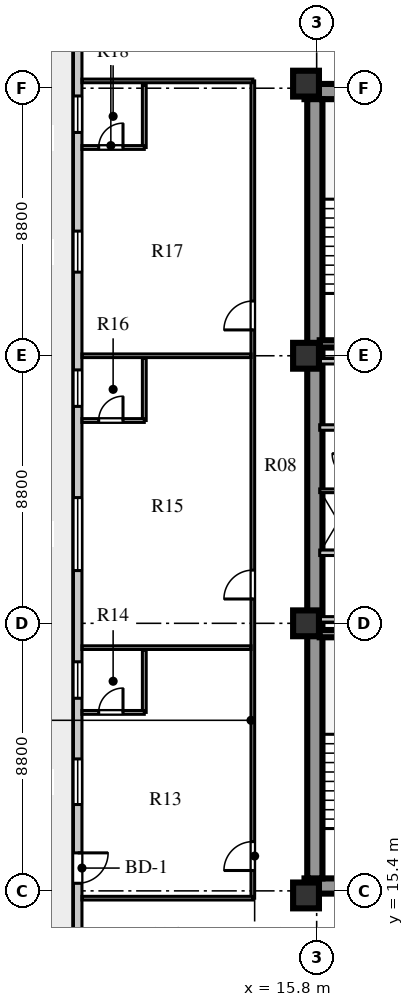
"""IFC4 building model, lengths in metres.
Left out: names, types, materials, properties, quantities, classifications, styles, units other than length and angle.
Written with IfcOpenShell. Run it as: python <this file> out.ifc"""

import sys

from ifc_helpers import new_model, si_unit, direction, frame, frame_2d, origin, origin_2d, place, context, subcontext, project, spatial, rectangle, extrude, element, fill, save


model = new_model("IFC4")
c1 = context("Model", 3, precision=1e-05, world=origin(), true_north=direction((0.0, 1.0)))
c2 = subcontext(c1, "Body", "Model", "MODEL_VIEW")
j1 = project(units=[si_unit("LENGTHUNIT", "METRE"), si_unit("PLANEANGLEUNIT", "RADIAN")], contexts=[c1])
p1 = place(None, origin())
s1 = spatial("IfcSite", under=j1, at=p1, CompositionType="ELEMENT")
p2 = place(p1, origin())
s2 = spatial("IfcBuilding", under=s1, at=p2, CompositionType="ELEMENT")
p3 = place(p2, frame((0.0, 0.0, 181.0)))
s3 = spatial("IfcBuildingStorey", under=s2, at=p3, CompositionType="ELEMENT", Elevation=181.0)
for number, where, z_axis, x_axis in (
    (1, (15.4, 15.56, 0.0), (0.0, 0.0, 1.0), (1.0, 0.0, 0.0)),
    (2, (15.4, 41.69, 0.0), (0.0, 0.0, 1.0), (1.0, 0.0, 0.0)),
):
    element("IfcWall", number, at=place(p3, frame(where, z_axis=z_axis, x_axis=x_axis)), inside=s3, PredefinedType="SHEAR", context=c2, shape_type="SweptSolid", body=[
        extrude(rectangle(XDim=9.68, YDim=0.5, at=frame_2d((4.84, 0.0))), origin(), (0.0, 0.0, 1.0), 3.6),
    ])
p4 = place(p3, frame((15.74, 15.81, 0.0), z_axis=(0.0, 0.0, 1.0), x_axis=(0.0, 1.0, 0.0)))
e3 = element("IfcWall", 3, at=p4, inside=s3, PredefinedType="SHEAR", context=c2, shape_type="SweptSolid", body=[
    extrude(rectangle(XDim=25.63, YDim=0.5, at=frame_2d((12.815, 0.0))), origin(), (0.0, 0.0, 1.0), 3.6),
])
for number, where, z_axis, x_axis in (
    (4, (15.45, 15.25, 0.0), (0.0, 0.0, 1.0), (1.0, 0.0, 0.0)),
    (5, (15.45, 24.2, 0.0), (0.0, 0.0, 1.0), (1.0, 0.0, 0.0)),
    (6, (15.45, 33.0, 0.0), (0.0, 0.0, 1.0), (1.0, 0.0, 0.0)),
    (7, (15.45, 41.95, 0.0), (0.0, 0.0, 1.0), (1.0, 0.0, 0.0)),
):
    element("IfcColumn", number, at=place(p3, frame(where, z_axis=z_axis, x_axis=x_axis)), inside=s3, PredefinedType="COLUMN", context=c2, shape_type="SweptSolid", body=[
        extrude(rectangle(XDim=0.85, YDim=0.85, at=origin_2d()), origin(), (0.0, 0.0, 1.0), 3.6),
    ])
p5 = place(p3, frame((7.94, 44.07, 0.0), z_axis=(0.0, 0.0, 1.0), x_axis=(0.0, -1.0, 0.0)))
e8 = element("IfcWall", 8, at=p5, inside=s3, PredefinedType="STANDARD", context=c2, shape_type="SweptSolid", body=[
    extrude(rectangle(XDim=30.94, YDim=0.28, at=frame_2d((15.47, 0.0))), origin(), (0.0, 0.0, 1.0), 3.6),
])
p6 = place(p5, frame((27.42, 0.0, 0.0)))
e9 = element("IfcOpeningElement", 9, at=p6, cuts=e8, PredefinedType="OPENING", context=c2, shape_type="SweptSolid", body=[
    extrude(rectangle(XDim=1.0, YDim=2.05, at=frame_2d((0.5, 1.025))), frame((0.0, 0.15, 0.0), z_axis=(0.0, -1.0, 0.0), x_axis=(1.0, 0.0, 0.0)), (0.0, 0.0, 1.0), 0.3),
])
p7 = place(p5, frame((24.33, 0.0, 0.8)))
e10 = element("IfcOpeningElement", 10, at=p7, cuts=e8, PredefinedType="OPENING", context=c2, shape_type="SweptSolid", body=[
    extrude(rectangle(XDim=1.5, YDim=2.0, at=frame_2d((0.75, 1.0))), frame((0.0, 0.15, 0.0), z_axis=(0.0, -1.0, 0.0), x_axis=(1.0, 0.0, 0.0)), (0.0, 0.0, 1.0), 0.3),
])
p8 = place(p5, frame((21.135, 0.0, 0.8)))
e11 = element("IfcOpeningElement", 11, at=p8, cuts=e8, PredefinedType="OPENING", context=c2, shape_type="SweptSolid", body=[
    extrude(rectangle(XDim=1.2, YDim=1.75, at=frame_2d((0.6, 0.875))), frame((0.0, 0.15, 0.0), z_axis=(0.0, -1.0, 0.0), x_axis=(1.0, 0.0, 0.0)), (0.0, 0.0, 1.0), 0.3),
])
p9 = place(p5, frame((15.735, 0.0, 0.8)))
e12 = element("IfcOpeningElement", 12, at=p9, cuts=e8, PredefinedType="OPENING", context=c2, shape_type="SweptSolid", body=[
    extrude(rectangle(XDim=2.4, YDim=2.05, at=frame_2d((1.2, 1.025))), frame((0.0, 0.15, 0.0), z_axis=(0.0, -1.0, 0.0), x_axis=(1.0, 0.0, 0.0)), (0.0, 0.0, 1.0), 0.3),
])
p10 = place(p5, frame((11.535, 0.0, 0.8)))
e13 = element("IfcOpeningElement", 13, at=p10, cuts=e8, PredefinedType="OPENING", context=c2, shape_type="SweptSolid", body=[
    extrude(rectangle(XDim=1.2, YDim=1.75, at=frame_2d((0.6, 0.875))), frame((0.0, 0.15, 0.0), z_axis=(0.0, -1.0, 0.0), x_axis=(1.0, 0.0, 0.0)), (0.0, 0.0, 1.0), 0.3),
])
p11 = place(p5, frame((6.97, 0.0, 0.8)))
e14 = element("IfcOpeningElement", 14, at=p11, cuts=e8, PredefinedType="OPENING", context=c2, shape_type="SweptSolid", body=[
    extrude(rectangle(XDim=1.35, YDim=1.9, at=frame_2d((0.675, 0.95))), frame((0.0, 0.15, 0.0), z_axis=(0.0, -1.0, 0.0), x_axis=(1.0, 0.0, 0.0)), (0.0, 0.0, 1.0), 0.3),
])
p12 = place(p5, frame((2.525, 0.0, 0.8)))
e15 = element("IfcOpeningElement", 15, at=p12, cuts=e8, PredefinedType="OPENING", context=c2, shape_type="SweptSolid", body=[
    extrude(rectangle(XDim=1.2, YDim=1.75, at=frame_2d((0.6, 0.875))), frame((0.0, 0.15, 0.0), z_axis=(0.0, -1.0, 0.0), x_axis=(1.0, 0.0, 0.0)), (0.0, 0.0, 1.0), 0.3),
])
p13 = place(p3, frame((15.9, 23.86, 0.0), z_axis=(0.0, 0.0, 1.0), x_axis=(1.0, 0.0, 0.0)))
e16 = element("IfcWall", 16, at=p13, inside=s3, PredefinedType="SHEAR", context=c2, shape_type="SweptSolid", body=[
    extrude(rectangle(XDim=3.52, YDim=0.24, at=frame_2d((1.76, 0.0))), origin(), (0.0, 0.0, 1.0), 3.85),
])
p14 = place(p3, frame((15.9, 26.52, 0.0), z_axis=(0.0, 0.0, 1.0), x_axis=(1.0, 0.0, 0.0)))
e17 = element("IfcWall", 17, at=p14, inside=s3, PredefinedType="SOLIDWALL", context=c2, shape_type="SweptSolid", body=[
    extrude(rectangle(XDim=8.68, YDim=0.18, at=frame_2d((4.34, 0.0))), origin(), (0.0, 0.0, 1.0), 3.6),
])
p15 = place(p14, frame((2.05, 0.0, 0.0)))
e18 = element("IfcOpeningElement", 18, at=p15, cuts=e17, PredefinedType="OPENING", context=c2, shape_type="SweptSolid", body=[
    extrude(rectangle(XDim=0.85, YDim=2.06, at=frame_2d((0.425, 1.03))), frame((0.0, 0.1, 0.0), z_axis=(0.0, -1.0, 0.0), x_axis=(1.0, 0.0, 0.0)), (0.0, 0.0, 1.0), 0.2),
])
p16 = place(p14, frame((5.2, 0.0, 0.0)))
e19 = element("IfcOpeningElement", 19, at=p16, cuts=e17, PredefinedType="OPENING", context=c2, shape_type="SweptSolid", body=[
    extrude(rectangle(XDim=0.95, YDim=2.1, at=frame_2d((0.475, 1.05))), frame((0.0, 0.1, 0.0), z_axis=(0.0, -1.0, 0.0), x_axis=(1.0, 0.0, 0.0)), (0.0, 0.0, 1.0), 0.2),
])
p17 = place(p3, frame((15.9, 24.33, 0.0), z_axis=(0.0, 0.0, 1.0), x_axis=(1.0, 0.0, 0.0)))
e20 = element("IfcWall", 20, at=p17, inside=s3, PredefinedType="SOLIDWALL", context=c2, shape_type="SweptSolid", body=[
    extrude(rectangle(XDim=8.68, YDim=0.18, at=frame_2d((4.34, 0.0))), origin(), (0.0, 0.0, 1.0), 2.95),
])
p18 = place(p3, frame((15.9, 28.56, 0.0), z_axis=(0.0, 0.0, 1.0), x_axis=(1.0, 0.0, 0.0)))
e21 = element("IfcWall", 21, at=p18, inside=s3, PredefinedType="PARTITIONING", context=c2, shape_type="SweptSolid", body=[
    extrude(rectangle(XDim=1.2, YDim=0.12, at=frame_2d((0.6, 0.0))), origin(), (0.0, 0.0, 1.0), 3.6),
])
p19 = place(p3, frame((15.9, 30.64, 0.0), z_axis=(0.0, 0.0, 1.0), x_axis=(1.0, 0.0, 0.0)))
e22 = element("IfcWall", 22, at=p19, inside=s3, PredefinedType="SOLIDWALL", context=c2, shape_type="SweptSolid", body=[
    extrude(rectangle(XDim=8.68, YDim=0.18, at=frame_2d((4.34, 0.0))), origin(), (0.0, 0.0, 1.0), 3.6),
])
p20 = place(p19, frame((1.76, 0.0, 0.0)))
e23 = element("IfcOpeningElement", 23, at=p20, cuts=e22, PredefinedType="OPENING", context=c2, shape_type="SweptSolid", body=[
    extrude(rectangle(XDim=1.0, YDim=2.1, at=frame_2d((0.5, 1.05))), frame((0.0, 0.1, 0.0), z_axis=(0.0, -1.0, 0.0), x_axis=(1.0, 0.0, 0.0)), (0.0, 0.0, 1.0), 0.2),
])
p21 = place(p19, frame((3.6, 0.0, 0.0)))
e24 = element("IfcOpeningElement", 24, at=p21, cuts=e22, PredefinedType="OPENING", context=c2, shape_type="SweptSolid", body=[
    extrude(rectangle(XDim=1.0, YDim=2.1, at=frame_2d((0.5, 1.05))), frame((0.0, 0.1, 0.0), z_axis=(0.0, -1.0, 0.0), x_axis=(1.0, 0.0, 0.0)), (0.0, 0.0, 1.0), 0.2),
])
p22 = place(p19, frame((5.44, 0.0, 0.0)))
e25 = element("IfcOpeningElement", 25, at=p22, cuts=e22, PredefinedType="OPENING", context=c2, shape_type="SweptSolid", body=[
    extrude(rectangle(XDim=1.0, YDim=2.1, at=frame_2d((0.5, 1.05))), frame((0.0, 0.1, 0.0), z_axis=(0.0, -1.0, 0.0), x_axis=(1.0, 0.0, 0.0)), (0.0, 0.0, 1.0), 0.2),
])
p23 = place(p19, frame((7.28, 0.0, 0.0)))
e26 = element("IfcOpeningElement", 26, at=p23, cuts=e22, PredefinedType="OPENING", context=c2, shape_type="SweptSolid", body=[
    extrude(rectangle(XDim=1.0, YDim=2.1, at=frame_2d((0.5, 1.05))), frame((0.0, 0.1, 0.0), z_axis=(0.0, -1.0, 0.0), x_axis=(1.0, 0.0, 0.0)), (0.0, 0.0, 1.0), 0.2),
])
p24 = place(p3, frame((15.9, 32.82, 0.0), z_axis=(0.0, 0.0, 1.0), x_axis=(1.0, 0.0, 0.0)))
e27 = element("IfcWall", 27, at=p24, inside=s3, PredefinedType="SOLIDWALL", context=c2, shape_type="SweptSolid", body=[
    extrude(rectangle(XDim=8.68, YDim=0.18, at=frame_2d((4.34, 0.0))), origin(), (0.0, 0.0, 1.0), 2.95),
])
p25 = place(p3, frame((15.9, 33.39, 0.0), z_axis=(0.0, 0.0, 1.0), x_axis=(1.0, 0.0, 0.0)))
e28 = element("IfcWall", 28, at=p25, inside=s3, PredefinedType="SHEAR", context=c2, shape_type="SweptSolid", body=[
    extrude(rectangle(XDim=3.52, YDim=0.24, at=frame_2d((1.76, 0.0))), origin(), (0.0, 0.0, 1.0), 3.85),
])
p26 = place(p3, frame((13.7, 15.16, 0.0), z_axis=(0.0, 0.0, 1.0), x_axis=(0.0, 1.0, 0.0)))
e29 = element("IfcWall", 29, at=p26, inside=s3, PredefinedType="PARTITIONING", context=c2, shape_type="SweptSolid", body=[
    extrude(rectangle(XDim=26.88, YDim=0.12, at=frame_2d((13.44, 0.0))), origin(), (0.0, 0.0, 1.0), 3.6),
])
p27 = place(p26, frame((0.91, 0.0, 0.0)))
e30 = element("IfcOpeningElement", 30, at=p27, cuts=e29, PredefinedType="OPENING", context=c2, shape_type="SweptSolid", body=[
    extrude(rectangle(XDim=0.95, YDim=2.1, at=frame_2d((0.475, 1.05))), frame((0.0, 0.07, 0.0), z_axis=(0.0, -1.0, 0.0), x_axis=(1.0, 0.0, 0.0)), (0.0, 0.0, 1.0), 0.14),
])
p28 = place(p26, frame((9.84, 0.0, 0.0)))
e31 = element("IfcOpeningElement", 31, at=p28, cuts=e29, PredefinedType="OPENING", context=c2, shape_type="SweptSolid", body=[
    extrude(rectangle(XDim=0.95, YDim=2.1, at=frame_2d((0.475, 1.05))), frame((0.0, 0.07, 0.0), z_axis=(0.0, -1.0, 0.0), x_axis=(1.0, 0.0, 0.0)), (0.0, 0.0, 1.0), 0.14),
])
p29 = place(p26, frame((18.69, 0.0, 0.0)))
e32 = element("IfcOpeningElement", 32, at=p29, cuts=e29, PredefinedType="OPENING", context=c2, shape_type="SweptSolid", body=[
    extrude(rectangle(XDim=0.95, YDim=2.1, at=frame_2d((0.475, 1.05))), frame((0.0, 0.07, 0.0), z_axis=(0.0, -1.0, 0.0), x_axis=(1.0, 0.0, 0.0)), (0.0, 0.0, 1.0), 0.14),
])
for number, where, z_axis, x_axis in (
    (33, (8.08, 15.16, 0.0), (0.0, 0.0, 1.0), (1.0, 0.0, 0.0)),
    (34, (8.08, 42.04, 0.0), (0.0, 0.0, 1.0), (1.0, 0.0, 0.0)),
):
    element("IfcWall", number, at=place(p3, frame(where, z_axis=z_axis, x_axis=x_axis)), inside=s3, PredefinedType="PARTITIONING", context=c2, shape_type="SweptSolid", body=[
        extrude(rectangle(XDim=5.62, YDim=0.12, at=frame_2d((2.81, 0.0))), origin(), (0.0, 0.0, 1.0), 3.15),
    ])
p30 = place(p3, frame((10.13, 21.27, 0.0), z_axis=(0.0, 0.0, 1.0), x_axis=(0.0, 1.0, 0.0)))
e35 = element("IfcWall", 35, at=p30, inside=s3, PredefinedType="PLUMBINGWALL", context=c2, shape_type="SweptSolid", body=[
    extrude(rectangle(XDim=2.05, YDim=0.125, at=frame_2d((1.025, 0.0))), origin(), (0.0, 0.0, 1.0), 3.6),
])
p31 = place(p3, frame((8.08, 21.27, 0.0), z_axis=(0.0, 0.0, 1.0), x_axis=(1.0, 0.0, 0.0)))
e36 = element("IfcWall", 36, at=p31, inside=s3, PredefinedType="PLUMBINGWALL", context=c2, shape_type="SweptSolid", body=[
    extrude(rectangle(XDim=2.05, YDim=0.125, at=frame_2d((1.025, 0.0))), origin(), (0.0, 0.0, 1.0), 3.6),
])
p32 = place(p31, frame((0.55, 0.0, 0.0)))
e37 = element("IfcOpeningElement", 37, at=p32, cuts=e36, PredefinedType="OPENING", context=c2, shape_type="SweptSolid", body=[
    extrude(rectangle(XDim=0.8, YDim=2.05, at=frame_2d((0.4, 1.025))), frame((0.0, 0.073, 0.0), z_axis=(0.0, -1.0, 0.0), x_axis=(1.0, 0.0, 0.0)), (0.0, 0.0, 1.0), 0.145),
])
p33 = place(p3, frame((8.08, 23.4, 0.0), z_axis=(0.0, 0.0, 1.0), x_axis=(1.0, 0.0, 0.0)))
e38 = element("IfcWall", 38, at=p33, inside=s3, PredefinedType="PARTITIONING", context=c2, shape_type="SweptSolid", body=[
    extrude(rectangle(XDim=5.56, YDim=0.12, at=frame_2d((2.78, 0.0))), origin(), (0.0, 0.0, 1.0), 3.6),
])
p34 = place(p3, frame((10.13, 30.87, 0.0), z_axis=(0.0, 0.0, 1.0), x_axis=(0.0, 1.0, 0.0)))
e39 = element("IfcWall", 39, at=p34, inside=s3, PredefinedType="PLUMBINGWALL", context=c2, shape_type="SweptSolid", body=[
    extrude(rectangle(XDim=2.05, YDim=0.125, at=frame_2d((1.025, 0.0))), origin(), (0.0, 0.0, 1.0), 3.6),
])
p35 = place(p3, frame((8.08, 30.87, 0.0), z_axis=(0.0, 0.0, 1.0), x_axis=(1.0, 0.0, 0.0)))
e40 = element("IfcWall", 40, at=p35, inside=s3, PredefinedType="PLUMBINGWALL", context=c2, shape_type="SweptSolid", body=[
    extrude(rectangle(XDim=2.05, YDim=0.125, at=frame_2d((1.025, 0.0))), origin(), (0.0, 0.0, 1.0), 3.6),
])
p36 = place(p35, frame((0.55, 0.0, 0.0)))
e41 = element("IfcOpeningElement", 41, at=p36, cuts=e40, PredefinedType="OPENING", context=c2, shape_type="SweptSolid", body=[
    extrude(rectangle(XDim=0.8, YDim=2.05, at=frame_2d((0.4, 1.025))), frame((0.0, 0.073, 0.0), z_axis=(0.0, -1.0, 0.0), x_axis=(1.0, 0.0, 0.0)), (0.0, 0.0, 1.0), 0.145),
])
p37 = place(p3, frame((8.08, 33.0, 0.0), z_axis=(0.0, 0.0, 1.0), x_axis=(1.0, 0.0, 0.0)))
e42 = element("IfcWall", 42, at=p37, inside=s3, PredefinedType="PARTITIONING", context=c2, shape_type="SweptSolid", body=[
    extrude(rectangle(XDim=5.56, YDim=0.12, at=frame_2d((2.78, 0.0))), origin(), (0.0, 0.0, 1.0), 3.15),
])
p38 = place(p3, frame((10.13, 39.85, 0.0), z_axis=(0.0, 0.0, 1.0), x_axis=(0.0, 1.0, 0.0)))
e43 = element("IfcWall", 43, at=p38, inside=s3, PredefinedType="PLUMBINGWALL", context=c2, shape_type="SweptSolid", body=[
    extrude(rectangle(XDim=2.05, YDim=0.125, at=frame_2d((1.025, 0.0))), origin(), (0.0, 0.0, 1.0), 3.6),
])
p39 = place(p3, frame((8.08, 39.85, 0.0), z_axis=(0.0, 0.0, 1.0), x_axis=(1.0, 0.0, 0.0)))
e44 = element("IfcWall", 44, at=p39, inside=s3, PredefinedType="PLUMBINGWALL", context=c2, shape_type="SweptSolid", body=[
    extrude(rectangle(XDim=2.05, YDim=0.125, at=frame_2d((1.025, 0.0))), origin(), (0.0, 0.0, 1.0), 3.6),
])
p40 = place(p39, frame((0.55, 0.0, 0.0)))
e45 = element("IfcOpeningElement", 45, at=p40, cuts=e44, PredefinedType="OPENING", context=c2, shape_type="SweptSolid", body=[
    extrude(rectangle(XDim=0.8, YDim=2.05, at=frame_2d((0.4, 1.025))), frame((0.0, 0.073, 0.0), z_axis=(0.0, -1.0, 0.0), x_axis=(1.0, 0.0, 0.0)), (0.0, 0.0, 1.0), 0.145),
])
p41 = place(p6, frame((1.0, 0.0, 0.0), z_axis=(0.0, 0.0, 1.0), x_axis=(-1.0, 0.0, 0.0)))
e46 = element("IfcDoor", 46, at=p41, inside=s3, OperationType="SINGLE_SWING_RIGHT", PredefinedType="DOOR", context=c2, shape_type="SweptSolid", body=[
    extrude(rectangle(XDim=1.0, YDim=2.05, at=frame_2d((0.5, 1.025))), frame((0.0, 0.025, 0.0), z_axis=(0.0, -1.0, 0.0), x_axis=(1.0, 0.0, 0.0)), (0.0, 0.0, 1.0), 0.05),
])
fill(e9, e46)
p42 = place(p7, origin())
e47 = element("IfcWindow", 47, at=p42, inside=s3, PartitioningType="SINGLE_PANEL", PredefinedType="WINDOW", context=c2, shape_type="SweptSolid", body=[
    extrude(rectangle(XDim=1.5, YDim=2.0, at=frame_2d((0.75, 1.0))), frame((0.0, 0.03, 0.0), z_axis=(0.0, -1.0, 0.0), x_axis=(1.0, 0.0, 0.0)), (0.0, 0.0, 1.0), 0.06),
])
fill(e10, e47)
p43 = place(p8, origin())
e48 = element("IfcWindow", 48, at=p43, inside=s3, PartitioningType="SINGLE_PANEL", PredefinedType="WINDOW", context=c2, shape_type="SweptSolid", body=[
    extrude(rectangle(XDim=1.2, YDim=1.75, at=frame_2d((0.6, 0.875))), frame((0.0, 0.03, 0.0), z_axis=(0.0, -1.0, 0.0), x_axis=(1.0, 0.0, 0.0)), (0.0, 0.0, 1.0), 0.06),
])
fill(e11, e48)
p44 = place(p9, origin())
e49 = element("IfcWindow", 49, at=p44, inside=s3, PartitioningType="SINGLE_PANEL", PredefinedType="WINDOW", context=c2, shape_type="SweptSolid", body=[
    extrude(rectangle(XDim=2.4, YDim=2.05, at=frame_2d((1.2, 1.025))), frame((0.0, 0.03, 0.0), z_axis=(0.0, -1.0, 0.0), x_axis=(1.0, 0.0, 0.0)), (0.0, 0.0, 1.0), 0.06),
])
fill(e12, e49)
p45 = place(p10, origin())
e50 = element("IfcWindow", 50, at=p45, inside=s3, PartitioningType="SINGLE_PANEL", PredefinedType="WINDOW", context=c2, shape_type="SweptSolid", body=[
    extrude(rectangle(XDim=1.2, YDim=1.75, at=frame_2d((0.6, 0.875))), frame((0.0, 0.03, 0.0), z_axis=(0.0, -1.0, 0.0), x_axis=(1.0, 0.0, 0.0)), (0.0, 0.0, 1.0), 0.06),
])
fill(e13, e50)
p46 = place(p11, origin())
e51 = element("IfcWindow", 51, at=p46, inside=s3, PartitioningType="SINGLE_PANEL", PredefinedType="WINDOW", context=c2, shape_type="SweptSolid", body=[
    extrude(rectangle(XDim=1.35, YDim=1.9, at=frame_2d((0.675, 0.95))), frame((0.0, 0.03, 0.0), z_axis=(0.0, -1.0, 0.0), x_axis=(1.0, 0.0, 0.0)), (0.0, 0.0, 1.0), 0.06),
])
fill(e14, e51)
p47 = place(p12, origin())
e52 = element("IfcWindow", 52, at=p47, inside=s3, PartitioningType="SINGLE_PANEL", PredefinedType="WINDOW", context=c2, shape_type="SweptSolid", body=[
    extrude(rectangle(XDim=1.2, YDim=1.75, at=frame_2d((0.6, 0.875))), frame((0.0, 0.03, 0.0), z_axis=(0.0, -1.0, 0.0), x_axis=(1.0, 0.0, 0.0)), (0.0, 0.0, 1.0), 0.06),
])
fill(e15, e52)
p48 = place(p27, origin())
e53 = element("IfcDoor", 53, at=p48, inside=s3, OperationType="SINGLE_SWING_LEFT", PredefinedType="DOOR", context=c2, shape_type="SweptSolid", body=[
    extrude(rectangle(XDim=0.95, YDim=2.1, at=frame_2d((0.475, 1.05))), frame((0.0, 0.025, 0.0), z_axis=(0.0, -1.0, 0.0), x_axis=(1.0, 0.0, 0.0)), (0.0, 0.0, 1.0), 0.05),
])
fill(e30, e53)
p49 = place(p32, frame((0.8, 0.0, 0.0), z_axis=(0.0, 0.0, 1.0), x_axis=(-1.0, 0.0, 0.0)))
e54 = element("IfcDoor", 54, at=p49, inside=s3, OperationType="SINGLE_SWING_LEFT", PredefinedType="DOOR", context=c2, shape_type="SweptSolid", body=[
    extrude(rectangle(XDim=0.8, YDim=2.05, at=frame_2d((0.4, 1.025))), frame((0.0, 0.025, 0.0), z_axis=(0.0, -1.0, 0.0), x_axis=(1.0, 0.0, 0.0)), (0.0, 0.0, 1.0), 0.05),
])
fill(e37, e54)
p50 = place(p28, origin())
e55 = element("IfcDoor", 55, at=p50, inside=s3, OperationType="SINGLE_SWING_LEFT", PredefinedType="DOOR", context=c2, shape_type="SweptSolid", body=[
    extrude(rectangle(XDim=0.95, YDim=2.1, at=frame_2d((0.475, 1.05))), frame((0.0, 0.025, 0.0), z_axis=(0.0, -1.0, 0.0), x_axis=(1.0, 0.0, 0.0)), (0.0, 0.0, 1.0), 0.05),
])
fill(e31, e55)
p51 = place(p36, frame((0.8, 0.0, 0.0), z_axis=(0.0, 0.0, 1.0), x_axis=(-1.0, 0.0, 0.0)))
e56 = element("IfcDoor", 56, at=p51, inside=s3, OperationType="SINGLE_SWING_LEFT", PredefinedType="DOOR", context=c2, shape_type="SweptSolid", body=[
    extrude(rectangle(XDim=0.8, YDim=2.05, at=frame_2d((0.4, 1.025))), frame((0.0, 0.025, 0.0), z_axis=(0.0, -1.0, 0.0), x_axis=(1.0, 0.0, 0.0)), (0.0, 0.0, 1.0), 0.05),
])
fill(e41, e56)
p52 = place(p29, origin())
e57 = element("IfcDoor", 57, at=p52, inside=s3, OperationType="SINGLE_SWING_LEFT", PredefinedType="DOOR", context=c2, shape_type="SweptSolid", body=[
    extrude(rectangle(XDim=0.95, YDim=2.1, at=frame_2d((0.475, 1.05))), frame((0.0, 0.025, 0.0), z_axis=(0.0, -1.0, 0.0), x_axis=(1.0, 0.0, 0.0)), (0.0, 0.0, 1.0), 0.05),
])
fill(e32, e57)
p53 = place(p40, frame((0.8, 0.0, 0.0), z_axis=(0.0, 0.0, 1.0), x_axis=(-1.0, 0.0, 0.0)))
e58 = element("IfcDoor", 58, at=p53, inside=s3, OperationType="SINGLE_SWING_LEFT", PredefinedType="DOOR", context=c2, shape_type="SweptSolid", body=[
    extrude(rectangle(XDim=0.8, YDim=2.05, at=frame_2d((0.4, 1.025))), frame((0.0, 0.025, 0.0), z_axis=(0.0, -1.0, 0.0), x_axis=(1.0, 0.0, 0.0)), (0.0, 0.0, 1.0), 0.05),
])
fill(e45, e58)
save(model, sys.argv[1])
